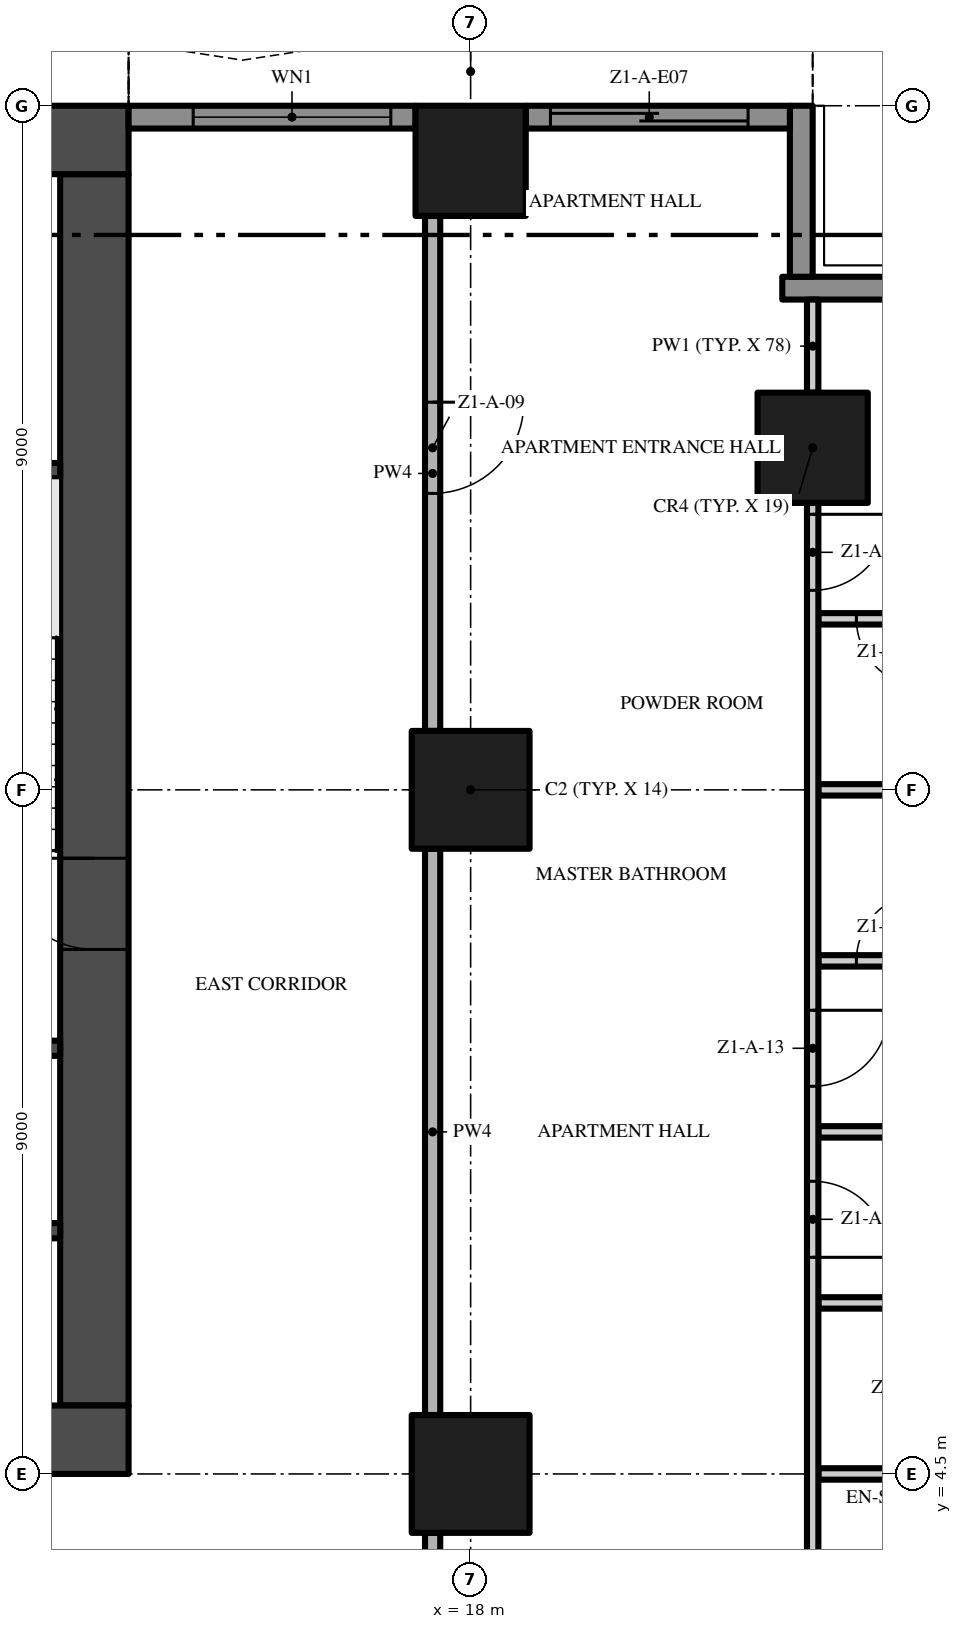
"""IFC4 building model, lengths in metres.
Left out: names, types, materials, properties, quantities, classifications, styles, units other than length and angle.
Written with IfcOpenShell. Run it as: python <this file> out.ifc"""

import sys

from ifc_helpers import new_model, si_unit, direction, frame, frame_2d, origin, origin_2d, place, context, subcontext, project, spatial, polyline, rectangle, outline, extrude, element, fill, save


model = new_model("IFC4")
c1 = context("Model", 3, precision=1e-05, world=origin(), true_north=direction((0.0, 1.0)))
c2 = subcontext(c1, "Body", "Model", "MODEL_VIEW")
j1 = project(units=[si_unit("LENGTHUNIT", "METRE"), si_unit("PLANEANGLEUNIT", "RADIAN")], contexts=[c1])
p1 = place(None, origin())
s1 = spatial("IfcSite", under=j1, at=p1, CompositionType="ELEMENT")
p2 = place(p1, origin())
s2 = spatial("IfcBuilding", under=s1, at=p2, CompositionType="ELEMENT")
p3 = place(p2, frame((0.0, 0.0, 22.6)))
s3 = spatial("IfcBuildingStorey", under=s2, at=p3, CompositionType="ELEMENT", Elevation=22.6)
p4 = place(p3, frame((-13.5, 4.95, -0.3), z_axis=(0.0, 0.0, 1.0), x_axis=(1.0, 0.0, 0.0)))
e1 = element("IfcWall", 1, at=p4, inside=s3, PredefinedType="SHEAR", context=c2, shape_type="SweptSolid", body=[
    extrude(rectangle(XDim=27.0, YDim=0.9, at=frame_2d((13.5, 0.0))), origin(), (0.0, 0.0, 1.0), 3.8),
])
p5 = place(p4, frame((12.0, 0.0, 0.3)))
e2 = element("IfcOpeningElement", 2, at=p5, cuts=e1, PredefinedType="OPENING", context=c2, shape_type="SweptSolid", body=[
    extrude(rectangle(XDim=3.0, YDim=2.4, at=frame_2d((1.5, 1.2))), frame((0.0, 0.46, 0.0), z_axis=(0.0, -1.0, 0.0), x_axis=(1.0, 0.0, 0.0)), (0.0, 0.0, 1.0), 0.92),
])
p6 = place(p4, frame((4.9, 0.0, 0.3)))
e3 = element("IfcOpeningElement", 3, at=p6, cuts=e1, PredefinedType="OPENING", context=c2, shape_type="SweptSolid", body=[
    extrude(rectangle(XDim=1.2, YDim=2.2, at=frame_2d((0.6, 1.1))), frame((0.0, 0.46, 0.0), z_axis=(0.0, -1.0, 0.0), x_axis=(1.0, 0.0, 0.0)), (0.0, 0.0, 1.0), 0.92),
])
p7 = place(p4, frame((20.75, 0.0, 0.3)))
e4 = element("IfcOpeningElement", 4, at=p7, cuts=e1, PredefinedType="OPENING", context=c2, shape_type="SweptSolid", body=[
    extrude(rectangle(XDim=1.5, YDim=2.2, at=frame_2d((0.75, 1.1))), frame((0.0, 0.46, 0.0), z_axis=(0.0, -1.0, 0.0), x_axis=(1.0, 0.0, 0.0)), (0.0, 0.0, 1.0), 0.92),
])
p8 = place(p4, frame((17.4, 0.0, 0.3)))
e5 = element("IfcOpeningElement", 5, at=p8, cuts=e1, PredefinedType="OPENING", context=c2, shape_type="SweptSolid", body=[
    extrude(rectangle(XDim=1.2, YDim=2.2, at=frame_2d((0.6, 1.1))), frame((0.0, 0.46, 0.0), z_axis=(0.0, -1.0, 0.0), x_axis=(1.0, 0.0, 0.0)), (0.0, 0.0, 1.0), 0.92),
])
p9 = place(p3, frame((13.05, 5.4, -0.3), z_axis=(0.0, 0.0, 1.0), x_axis=(0.0, 1.0, 0.0)))
e6 = element("IfcWall", 6, at=p9, inside=s3, PredefinedType="SHEAR", context=c2, shape_type="SweptSolid", body=[
    extrude(rectangle(XDim=16.2, YDim=0.9, at=frame_2d((8.1, 0.0))), origin(), (0.0, 0.0, 1.0), 3.8),
])
p10 = place(p9, frame((6.0, 0.0, 0.3)))
e7 = element("IfcOpeningElement", 7, at=p10, cuts=e6, PredefinedType="OPENING", context=c2, shape_type="SweptSolid", body=[
    extrude(rectangle(XDim=1.2, YDim=2.2, at=frame_2d((0.6, 1.1))), frame((0.0, 0.46, 0.0), z_axis=(0.0, -1.0, 0.0), x_axis=(1.0, 0.0, 0.0)), (0.0, 0.0, 1.0), 0.92),
])
p11 = place(p3, frame((13.5, 22.05, -0.3), z_axis=(0.0, 0.0, 1.0), x_axis=(-1.0, 0.0, 0.0)))
e8 = element("IfcWall", 8, at=p11, inside=s3, PredefinedType="SHEAR", context=c2, shape_type="SweptSolid", body=[
    extrude(rectangle(XDim=27.0, YDim=0.9, at=frame_2d((13.5, 0.0))), origin(), (0.0, 0.0, 1.0), 3.8),
])
p12 = place(p3, frame((18.0, 13.5, 0.0), z_axis=(0.0, 0.0, 1.0), x_axis=(1.0, 0.0, 0.0)))
e9 = element("IfcColumn", 9, at=p12, inside=s3, PredefinedType="COLUMN", context=c2, shape_type="SweptSolid", body=[
    extrude(rectangle(XDim=1.55, YDim=1.55, at=origin_2d()), origin(), (0.0, 0.0, 1.0), 3.5),
])
p13 = place(p3, frame((18.0, 21.775, 0.0), z_axis=(0.0, 0.0, 1.0), x_axis=(1.0, 0.0, 0.0)))
e10 = element("IfcColumn", 10, at=p13, inside=s3, PredefinedType="COLUMN", context=c2, shape_type="SweptSolid", body=[
    extrude(rectangle(XDim=1.45, YDim=1.45, at=origin_2d()), origin(), (0.0, 0.0, 1.0), 3.5),
])
p14 = place(p3, frame((18.0, 4.5, 0.0), z_axis=(0.0, 0.0, 1.0), x_axis=(1.0, 0.0, 0.0)))
e11 = element("IfcColumn", 11, at=p14, inside=s3, PredefinedType="COLUMN", context=c2, shape_type="SweptSolid", body=[
    extrude(rectangle(XDim=1.55, YDim=1.55, at=origin_2d()), origin(), (0.0, 0.0, 1.0), 3.5),
])
p15 = place(p3, frame((22.5, 18.0, 0.0), z_axis=(0.0, 0.0, 1.0), x_axis=(1.0, 0.0, 0.0)))
e12 = element("IfcColumn", 12, at=p15, inside=s3, PredefinedType="COLUMN", context=c2, shape_type="SweptSolid", body=[
    extrude(rectangle(XDim=1.45, YDim=1.45, at=origin_2d()), origin(), (0.0, 0.0, 1.0), 3.5),
])
p16 = place(p3, frame((22.1, 20.1, 0.0), z_axis=(0.0, 0.0, 1.0), x_axis=(1.0, 0.0, 0.0)))
e13 = element("IfcWall", 13, at=p16, inside=s3, PredefinedType="SOLIDWALL", context=c2, shape_type="SweptSolid", body=[
    extrude(rectangle(XDim=2.35, YDim=0.3, at=frame_2d((1.175, 0.0))), origin(), (0.0, 0.0, 1.0), 3.5),
])
p17 = place(p3, frame((22.35, 22.5, 0.0), z_axis=(0.0, 0.0, 1.0), x_axis=(0.0, -1.0, 0.0)))
e14 = element("IfcWall", 14, at=p17, inside=s3, PredefinedType="SOLIDWALL", context=c2, shape_type="SweptSolid", body=[
    extrude(rectangle(XDim=2.25, YDim=0.3, at=frame_2d((1.125, 0.0))), origin(), (0.0, 0.0, 1.0), 3.5),
])
p18 = place(p3, frame((18.725, 22.35, 0.0), z_axis=(0.0, 0.0, 1.0), x_axis=(1.0, 0.0, 0.0)))
e15 = element("IfcWall", 15, at=p18, inside=s3, PredefinedType="SOLIDWALL", context=c2, shape_type="SweptSolid", body=[
    extrude(rectangle(XDim=3.475, YDim=0.3, at=frame_2d((1.738, 0.0))), origin(), (0.0, 0.0, 1.0), 3.5),
])
p19 = place(p18, frame((0.325, 0.0, 0.0)))
e16 = element("IfcOpeningElement", 16, at=p19, cuts=e15, PredefinedType="OPENING", context=c2, shape_type="SweptSolid", body=[
    extrude(rectangle(XDim=2.6, YDim=2.4, at=frame_2d((1.3, 1.2))), frame((0.0, 0.16, 0.0), z_axis=(0.0, -1.0, 0.0), x_axis=(1.0, 0.0, 0.0)), (0.0, 0.0, 1.0), 0.32),
])
p20 = place(p3, frame((13.5, 22.35, 0.0), z_axis=(0.0, 0.0, 1.0), x_axis=(1.0, 0.0, 0.0)))
e17 = element("IfcWall", 17, at=p20, inside=s3, PredefinedType="SOLIDWALL", context=c2, shape_type="SweptSolid", body=[
    extrude(rectangle(XDim=3.775, YDim=0.3, at=frame_2d((1.887, 0.0))), origin(), (0.0, 0.0, 1.0), 3.5),
])
p21 = place(p20, frame((0.85, 0.0, 0.45)))
e18 = element("IfcOpeningElement", 18, at=p21, cuts=e17, PredefinedType="OPENING", context=c2, shape_type="SweptSolid", body=[
    extrude(rectangle(XDim=2.6, YDim=2.65, at=frame_2d((1.3, 1.325))), frame((0.0, 0.16, 0.0), z_axis=(0.0, -1.0, 0.0), x_axis=(1.0, 0.0, 0.0)), (0.0, 0.0, 1.0), 0.32),
])
p22 = place(p3, origin())
e19 = element("IfcWall", 19, at=p22, inside=s3, PredefinedType="USERDEFINED", context=c2, shape_type="SweptSolid", body=[
    extrude(outline(polyline([(22.5, 25.5), (21.0, 25.271), (19.5, 24.671), (18.0, 23.929), (16.5, 23.329), (15.0, 23.1), (13.5, 23.329), (13.462, 23.082), (15.0, 22.847), (16.566, 23.086), (18.102, 23.701), (19.602, 24.442), (21.066, 25.028), (22.538, 25.253), (22.5, 25.5)])), origin(), (0.0, 0.0, 1.0), 0.9),
])
for number, where, z_axis, x_axis in (
    (20, (9.65, 7.7, 0.0), (0.0, 0.0, 1.0), (1.0, 0.0, 0.0)),
    (21, (9.65, 10.1, 0.0), (0.0, 0.0, 1.0), (1.0, 0.0, 0.0)),
    (22, (9.65, 17.7, 0.0), (0.0, 0.0, 1.0), (1.0, 0.0, 0.0)),
):
    element("IfcWall", number, at=place(p3, frame(where, z_axis=z_axis, x_axis=x_axis)), inside=s3, PredefinedType="SHEAR", context=c2, shape_type="SweptSolid", body=[
        extrude(rectangle(XDim=2.95, YDim=0.2, at=frame_2d((1.475, 0.0))), origin(), (0.0, 0.0, 1.0), 3.5),
    ])
p23 = place(p3, frame((22.575, 4.5, 0.0), z_axis=(0.0, 0.0, 1.0), x_axis=(1.0, 0.0, 0.0)))
e23 = element("IfcWall", 23, at=p23, inside=s3, PredefinedType="PARTITIONING", context=c2, shape_type="SweptSolid", body=[
    extrude(rectangle(XDim=2.975, YDim=0.15, at=frame_2d((1.488, 0.0))), origin(), (0.0, 0.0, 1.0), 3.5),
])
p24 = place(p3, frame((22.575, 6.75, 0.0), z_axis=(0.0, 0.0, 1.0), x_axis=(1.0, 0.0, 0.0)))
e24 = element("IfcWall", 24, at=p24, inside=s3, PredefinedType="PARTITIONING", context=c2, shape_type="SweptSolid", body=[
    extrude(rectangle(XDim=1.875, YDim=0.15, at=frame_2d((0.938, 0.0))), origin(), (0.0, 0.0, 1.0), 3.5),
])
p25 = place(p3, frame((22.575, 9.0, 0.0), z_axis=(0.0, 0.0, 1.0), x_axis=(1.0, 0.0, 0.0)))
e25 = element("IfcWall", 25, at=p25, inside=s3, PredefinedType="PARTITIONING", context=c2, shape_type="SweptSolid", body=[
    extrude(rectangle(XDim=4.125, YDim=0.15, at=frame_2d((2.062, 0.0))), origin(), (0.0, 0.0, 1.0), 3.5),
])
p26 = place(p3, frame((22.575, 11.25, 0.0), z_axis=(0.0, 0.0, 1.0), x_axis=(1.0, 0.0, 0.0)))
e26 = element("IfcWall", 26, at=p26, inside=s3, PredefinedType="PARTITIONING", context=c2, shape_type="SweptSolid", body=[
    extrude(rectangle(XDim=1.875, YDim=0.15, at=frame_2d((0.938, 0.0))), origin(), (0.0, 0.0, 1.0), 3.5),
])
p27 = place(p26, frame((0.5, 0.0, 0.0)))
e27 = element("IfcOpeningElement", 27, at=p27, cuts=e26, PredefinedType="OPENING", context=c2, shape_type="SweptSolid", body=[
    extrude(rectangle(XDim=0.9, YDim=2.1, at=frame_2d((0.45, 1.05))), frame((0.0, 0.085, 0.0), z_axis=(0.0, -1.0, 0.0), x_axis=(1.0, 0.0, 0.0)), (0.0, 0.0, 1.0), 0.17),
])
p28 = place(p3, frame((22.575, 13.5, 0.0), z_axis=(0.0, 0.0, 1.0), x_axis=(1.0, 0.0, 0.0)))
e28 = element("IfcWall", 28, at=p28, inside=s3, PredefinedType="PARTITIONING", context=c2, shape_type="SweptSolid", body=[
    extrude(rectangle(XDim=1.875, YDim=0.15, at=frame_2d((0.938, 0.0))), origin(), (0.0, 0.0, 1.0), 3.5),
])
p29 = place(p3, frame((24.45, 15.75, 0.0), z_axis=(0.0, 0.0, 1.0), x_axis=(-1.0, 0.0, 0.0)))
e29 = element("IfcWall", 29, at=p29, inside=s3, PredefinedType="PARTITIONING", context=c2, shape_type="SweptSolid", body=[
    extrude(rectangle(XDim=1.875, YDim=0.15, at=frame_2d((0.938, 0.0))), origin(), (0.0, 0.0, 1.0), 3.5),
])
p30 = place(p29, frame((0.475, 0.0, 0.0)))
e30 = element("IfcOpeningElement", 30, at=p30, cuts=e29, PredefinedType="OPENING", context=c2, shape_type="SweptSolid", body=[
    extrude(rectangle(XDim=0.9, YDim=2.1, at=frame_2d((0.45, 1.05))), frame((0.0, 0.085, 0.0), z_axis=(0.0, -1.0, 0.0), x_axis=(1.0, 0.0, 0.0)), (0.0, 0.0, 1.0), 0.17),
])
p31 = place(p3, frame((17.5, -0.2, 0.0), z_axis=(0.0, 0.0, 1.0), x_axis=(0.0, 1.0, 0.0)))
e31 = element("IfcWall", 31, at=p31, inside=s3, PredefinedType="PARTITIONING", context=c2, shape_type="SweptSolid", body=[
    extrude(rectangle(XDim=3.925, YDim=0.2, at=frame_2d((1.962, 0.0))), origin(), (0.0, 0.0, 1.0), 3.5),
])
p32 = place(p3, frame((17.5, 5.275, 0.0), z_axis=(0.0, 0.0, 1.0), x_axis=(0.0, 1.0, 0.0)))
e32 = element("IfcWall", 32, at=p32, inside=s3, PredefinedType="PARTITIONING", context=c2, shape_type="SweptSolid", body=[
    extrude(rectangle(XDim=7.45, YDim=0.2, at=frame_2d((3.725, 0.0))), origin(), (0.0, 0.0, 1.0), 3.5),
])
p33 = place(p3, frame((17.5, 21.05, 0.0), z_axis=(0.0, 0.0, 1.0), x_axis=(0.0, -1.0, 0.0)))
e33 = element("IfcWall", 33, at=p33, inside=s3, PredefinedType="PARTITIONING", context=c2, shape_type="SweptSolid", body=[
    extrude(rectangle(XDim=6.775, YDim=0.2, at=frame_2d((3.388, 0.0))), origin(), (0.0, 0.0, 1.0), 3.5),
])
p34 = place(p33, frame((2.45, 0.0, 0.0)))
e34 = element("IfcOpeningElement", 34, at=p34, cuts=e33, PredefinedType="OPENING", context=c2, shape_type="SweptSolid", body=[
    extrude(rectangle(XDim=1.2, YDim=2.4, at=frame_2d((0.6, 1.2))), frame((0.0, 0.11, 0.0), z_axis=(0.0, -1.0, 0.0), x_axis=(1.0, 0.0, 0.0)), (0.0, 0.0, 1.0), 0.22),
])
p35 = place(p3, frame((22.5, 17.275, 0.0), z_axis=(0.0, 0.0, 1.0), x_axis=(0.0, -1.0, 0.0)))
e35 = element("IfcWall", 35, at=p35, inside=s3, PredefinedType="PARTITIONING", context=c2, shape_type="SweptSolid", body=[
    extrude(rectangle(XDim=17.175, YDim=0.15, at=frame_2d((8.588, 0.0))), origin(), (0.0, 0.0, 1.0), 3.5),
])
p36 = place(p35, frame((14.525, 0.0, 0.0)))
e36 = element("IfcOpeningElement", 36, at=p36, cuts=e35, PredefinedType="OPENING", context=c2, shape_type="SweptSolid", body=[
    extrude(rectangle(XDim=1.0, YDim=2.4, at=frame_2d((0.5, 1.2))), frame((0.0, 0.085, 0.0), z_axis=(0.0, -1.0, 0.0), x_axis=(1.0, 0.0, 0.0)), (0.0, 0.0, 1.0), 0.17),
])
p37 = place(p35, frame((8.925, 0.0, 0.0)))
e37 = element("IfcOpeningElement", 37, at=p37, cuts=e35, PredefinedType="OPENING", context=c2, shape_type="SweptSolid", body=[
    extrude(rectangle(XDim=1.0, YDim=2.4, at=frame_2d((0.5, 1.2))), frame((0.0, 0.085, 0.0), z_axis=(0.0, -1.0, 0.0), x_axis=(1.0, 0.0, 0.0)), (0.0, 0.0, 1.0), 0.17),
])
p38 = place(p35, frame((6.675, 0.0, 0.0)))
e38 = element("IfcOpeningElement", 38, at=p38, cuts=e35, PredefinedType="OPENING", context=c2, shape_type="SweptSolid", body=[
    extrude(rectangle(XDim=1.0, YDim=2.4, at=frame_2d((0.5, 1.2))), frame((0.0, 0.085, 0.0), z_axis=(0.0, -1.0, 0.0), x_axis=(1.0, 0.0, 0.0)), (0.0, 0.0, 1.0), 0.17),
])
p39 = place(p35, frame((0.15, 0.0, 0.0)))
e39 = element("IfcOpeningElement", 39, at=p39, cuts=e35, PredefinedType="OPENING", context=c2, shape_type="SweptSolid", body=[
    extrude(rectangle(XDim=1.0, YDim=2.4, at=frame_2d((0.5, 1.2))), frame((0.0, 0.085, 0.0), z_axis=(0.0, -1.0, 0.0), x_axis=(1.0, 0.0, 0.0)), (0.0, 0.0, 1.0), 0.17),
])
p40 = place(p3, frame((22.5, 18.725, 0.0), z_axis=(0.0, 0.0, 1.0), x_axis=(0.0, 1.0, 0.0)))
e40 = element("IfcWall", 40, at=p40, inside=s3, PredefinedType="PARTITIONING", context=c2, shape_type="SweptSolid", body=[
    extrude(rectangle(XDim=1.225, YDim=0.15, at=frame_2d((0.613, 0.0))), origin(), (0.0, 0.0, 1.0), 3.5),
])
p41 = place(p19, origin())
e41 = element("IfcDoor", 41, at=p41, inside=s3, OperationType="SINGLE_SWING_LEFT", PredefinedType="DOOR", context=c2, shape_type="SweptSolid", body=[
    extrude(rectangle(XDim=2.6, YDim=2.4, at=frame_2d((1.3, 1.2))), frame((0.0, 0.025, 0.0), z_axis=(0.0, -1.0, 0.0), x_axis=(1.0, 0.0, 0.0)), (0.0, 0.0, 1.0), 0.05),
])
fill(e16, e41)
p42 = place(p21, origin())
e42 = element("IfcWindow", 42, at=p42, inside=s3, PartitioningType="SINGLE_PANEL", PredefinedType="WINDOW", context=c2, shape_type="SweptSolid", body=[
    extrude(rectangle(XDim=2.6, YDim=2.65, at=frame_2d((1.3, 1.325))), frame((0.0, 0.03, 0.0), z_axis=(0.0, -1.0, 0.0), x_axis=(1.0, 0.0, 0.0)), (0.0, 0.0, 1.0), 0.06),
])
fill(e18, e42)
p43 = place(p10, frame((1.2, 0.0, 0.0), z_axis=(0.0, 0.0, 1.0), x_axis=(-1.0, 0.0, 0.0)))
e43 = element("IfcDoor", 43, at=p43, inside=s3, OperationType="SINGLE_SWING_LEFT", PredefinedType="DOOR", context=c2, shape_type="SweptSolid", body=[
    extrude(rectangle(XDim=1.2, YDim=2.2, at=frame_2d((0.6, 1.1))), frame((0.0, 0.025, 0.0), z_axis=(0.0, -1.0, 0.0), x_axis=(1.0, 0.0, 0.0)), (0.0, 0.0, 1.0), 0.05),
])
fill(e7, e43)
p44 = place(p34, origin())
e44 = element("IfcDoor", 44, at=p44, inside=s3, OperationType="SINGLE_SWING_LEFT", PredefinedType="DOOR", context=c2, shape_type="SweptSolid", body=[
    extrude(rectangle(XDim=1.2, YDim=2.4, at=frame_2d((0.6, 1.2))), frame((0.0, 0.025, 0.0), z_axis=(0.0, -1.0, 0.0), x_axis=(1.0, 0.0, 0.0)), (0.0, 0.0, 1.0), 0.05),
])
fill(e34, e44)
p45 = place(p37, origin())
e45 = element("IfcDoor", 45, at=p45, inside=s3, OperationType="SINGLE_SWING_RIGHT", PredefinedType="DOOR", context=c2, shape_type="SweptSolid", body=[
    extrude(rectangle(XDim=1.0, YDim=2.4, at=frame_2d((0.5, 1.2))), frame((0.0, 0.025, 0.0), z_axis=(0.0, -1.0, 0.0), x_axis=(1.0, 0.0, 0.0)), (0.0, 0.0, 1.0), 0.05),
])
fill(e37, e45)
p46 = place(p38, origin())
e46 = element("IfcDoor", 46, at=p46, inside=s3, OperationType="SINGLE_SWING_LEFT", PredefinedType="DOOR", context=c2, shape_type="SweptSolid", body=[
    extrude(rectangle(XDim=1.0, YDim=2.4, at=frame_2d((0.5, 1.2))), frame((0.0, 0.025, 0.0), z_axis=(0.0, -1.0, 0.0), x_axis=(1.0, 0.0, 0.0)), (0.0, 0.0, 1.0), 0.05),
])
fill(e38, e46)
p47 = place(p27, origin())
e47 = element("IfcDoor", 47, at=p47, inside=s3, OperationType="SINGLE_SWING_RIGHT", PredefinedType="DOOR", context=c2, shape_type="SweptSolid", body=[
    extrude(rectangle(XDim=0.9, YDim=2.1, at=frame_2d((0.45, 1.05))), frame((0.0, 0.025, 0.0), z_axis=(0.0, -1.0, 0.0), x_axis=(1.0, 0.0, 0.0)), (0.0, 0.0, 1.0), 0.05),
])
fill(e27, e47)
p48 = place(p39, origin())
e48 = element("IfcDoor", 48, at=p48, inside=s3, OperationType="SINGLE_SWING_LEFT", PredefinedType="DOOR", context=c2, shape_type="SweptSolid", body=[
    extrude(rectangle(XDim=1.0, YDim=2.4, at=frame_2d((0.5, 1.2))), frame((0.0, 0.025, 0.0), z_axis=(0.0, -1.0, 0.0), x_axis=(1.0, 0.0, 0.0)), (0.0, 0.0, 1.0), 0.05),
])
fill(e39, e48)
p49 = place(p30, origin())
e49 = element("IfcDoor", 49, at=p49, inside=s3, OperationType="SINGLE_SWING_LEFT", PredefinedType="DOOR", context=c2, shape_type="SweptSolid", body=[
    extrude(rectangle(XDim=0.9, YDim=2.1, at=frame_2d((0.45, 1.05))), frame((0.0, 0.025, 0.0), z_axis=(0.0, -1.0, 0.0), x_axis=(1.0, 0.0, 0.0)), (0.0, 0.0, 1.0), 0.05),
])
fill(e30, e49)
save(model, sys.argv[1])
